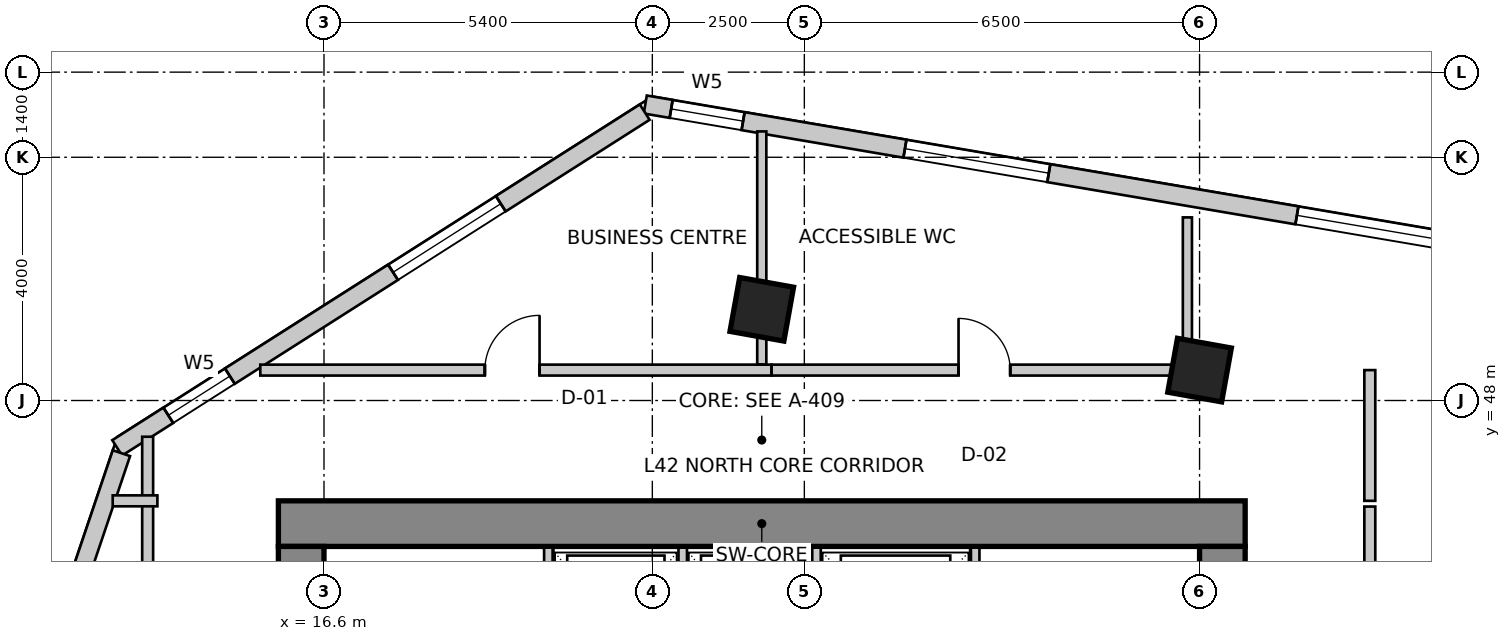
"""IFC4 building model, lengths in metres.
Left out: names, types, materials, properties, quantities, classifications, styles, units other than length and angle.
Written with IfcOpenShell. Run it as: python <this file> out.ifc"""

import sys

from ifc_helpers import new_model, si_unit, direction, frame, frame_2d, origin, origin_2d, place, context, subcontext, project, spatial, rectangle, extrude, source, transform, mapped, element, fill, save


model = new_model("IFC4")
c1 = context("Model", 3, precision=1e-05, world=origin(), true_north=direction((0.0, 1.0)))
c2 = subcontext(c1, "Body", "Model", "MODEL_VIEW")
j1 = project(units=[si_unit("LENGTHUNIT", "METRE"), si_unit("PLANEANGLEUNIT", "RADIAN")], contexts=[c1])
p1 = place(None, origin())
s1 = spatial("IfcSite", under=j1, at=p1, CompositionType="ELEMENT")
p2 = place(p1, origin())
s2 = spatial("IfcBuilding", under=s1, at=p2, CompositionType="ELEMENT")
p3 = place(p2, frame((0.0, 0.0, 168.2)))
s3 = spatial("IfcBuildingStorey", under=s2, at=p3, CompositionType="ELEMENT", Elevation=168.2)
p4 = place(p3, frame((15.85, 45.975, 0.0), z_axis=(0.0, 0.0, 1.0), x_axis=(1.0, 0.0, 0.0)))
e1 = element("IfcWall", 1, at=p4, inside=s3, PredefinedType="SHEAR", context=c2, shape_type="SweptSolid", body=[
    extrude(rectangle(XDim=15.9, YDim=0.75, at=frame_2d((7.95, 0.0))), origin(), (0.0, 0.0, 1.0), 3.6),
])
p5 = place(p3, frame((16.225, 34.2, 0.0), z_axis=(0.0, 0.0, 1.0), x_axis=(0.0, 1.0, 0.0)))
e2 = element("IfcWall", 2, at=p5, inside=s3, PredefinedType="SHEAR", context=c2, shape_type="SweptSolid", body=[
    extrude(rectangle(XDim=11.4, YDim=0.75, at=frame_2d((5.7, 0.0))), origin(), (0.0, 0.0, 1.0), 3.6),
])
m1 = source(origin(), c2, "Body", "SweptSolid", [
    extrude(rectangle(XDim=1.1, YDim=2.15, at=frame_2d((0.55, 1.075))), frame((0.0, 0.385, 0.0), z_axis=(0.0, -1.0, 0.0), x_axis=(1.0, 0.0, 0.0)), (0.0, 0.0, 1.0), 0.77),
])
p6 = place(p5, frame((7.15, 0.0, 0.0)))
e3 = element("IfcOpeningElement", 3, at=p6, cuts=e2, PredefinedType="OPENING", context=c2, shape_type="MappedRepresentation", body=[
    mapped(m1, transform((0.0, 0.0, 0.0), scale=1.0)),
])
p7 = place(p3, frame((31.375, 34.2, 0.0), z_axis=(0.0, 0.0, 1.0), x_axis=(0.0, 1.0, 0.0)))
e4 = element("IfcWall", 4, at=p7, inside=s3, PredefinedType="SHEAR", context=c2, shape_type="SweptSolid", body=[
    extrude(rectangle(XDim=11.4, YDim=0.75, at=frame_2d((5.7, 0.0))), origin(), (0.0, 0.0, 1.0), 3.6),
])
p8 = place(p7, frame((7.35, 0.0, 0.0)))
e5 = element("IfcOpeningElement", 5, at=p8, cuts=e4, PredefinedType="OPENING", context=c2, shape_type="MappedRepresentation", body=[
    mapped(m1, transform((0.0, 0.0, 0.0), scale=1.0)),
])
m2 = source(origin(), c2, "Body", "SweptSolid", [
    extrude(rectangle(XDim=0.9, YDim=0.9, at=origin_2d()), origin(), (0.0, 0.0, 1.0), 3.6),
])
for number, where, z_axis, x_axis in (
    (6, (23.8, 49.5, 0.0), (0.0, 0.0, 1.0), (0.984, -0.177, 0.0)),
    (7, (31.0, 48.5, 0.0), (0.0, 0.0, 1.0), (0.984, -0.177, 0.0)),
):
    element("IfcColumn", number, at=place(p3, frame(where, z_axis=z_axis, x_axis=x_axis)), inside=s3, PredefinedType="COLUMN", context=c2, shape_type="MappedRepresentation", body=[
        mapped(m2, transform((0.0, 0.0, 0.0), scale=1.0)),
    ])
p9 = place(p3, frame((53.561, 47.48, 0.0), z_axis=(0.0, 0.0, 1.0), x_axis=(-0.985845173895, 0.167658262868, 0.0)))
e8 = element("IfcWall", 8, at=p9, inside=s3, PredefinedType="SOLIDWALL", context=c2, shape_type="SweptSolid", body=[
    extrude(rectangle(XDim=32.132, YDim=0.3, at=frame_2d((16.066, 0.0))), origin(), (0.0, 0.0, 1.0), 3.3),
])
m3 = source(origin(), c2, "Body", "SweptSolid", [
    extrude(rectangle(XDim=2.4, YDim=2.2, at=frame_2d((1.2, 1.1))), frame((0.0, 0.16, 0.0), z_axis=(0.0, -1.0, 0.0), x_axis=(1.0, 0.0, 0.0)), (0.0, 0.0, 1.0), 0.32),
])
p10 = place(p9, frame((1.896, 0.0, 0.85)))
e9 = element("IfcOpeningElement", 9, at=p10, cuts=e8, PredefinedType="OPENING", context=c2, shape_type="MappedRepresentation", body=[
    mapped(m3, transform((0.0, 0.0, 0.0), scale=1.0)),
])
p11 = place(p9, frame((7.863, 0.0, 0.85)))
e10 = element("IfcOpeningElement", 10, at=p11, cuts=e8, PredefinedType="OPENING", context=c2, shape_type="MappedRepresentation", body=[
    mapped(m3, transform((0.0, 0.0, 0.0), scale=1.0)),
])
m4 = source(origin(), c2, "Body", "SweptSolid", [
    extrude(rectangle(XDim=2.1, YDim=2.0, at=frame_2d((1.05, 1.0))), frame((0.0, 0.16, 0.0), z_axis=(0.0, -1.0, 0.0), x_axis=(1.0, 0.0, 0.0)), (0.0, 0.0, 1.0), 0.32),
])
p12 = place(p9, frame((13.512, 0.0, 0.85)))
e11 = element("IfcOpeningElement", 11, at=p12, cuts=e8, PredefinedType="OPENING", context=c2, shape_type="MappedRepresentation", body=[
    mapped(m4, transform((0.0, 0.0, 0.0), scale=1.0)),
])
p13 = place(p9, frame((18.861, 0.0, 0.85)))
e12 = element("IfcOpeningElement", 12, at=p13, cuts=e8, PredefinedType="OPENING", context=c2, shape_type="MappedRepresentation", body=[
    mapped(m3, transform((0.0, 0.0, 0.0), scale=1.0)),
])
p14 = place(p9, frame((25.4, 0.0, 0.85)))
e13 = element("IfcOpeningElement", 13, at=p14, cuts=e8, PredefinedType="OPENING", context=c2, shape_type="MappedRepresentation", body=[
    mapped(m3, transform((0.0, 0.0, 0.0), scale=1.0)),
])
m5 = source(origin(), c2, "Body", "SweptSolid", [
    extrude(rectangle(XDim=1.2, YDim=1.6, at=frame_2d((0.6, 0.8))), frame((0.0, 0.16, 0.0), z_axis=(0.0, -1.0, 0.0), x_axis=(1.0, 0.0, 0.0)), (0.0, 0.0, 1.0), 0.32),
])
p15 = place(p9, frame((30.5, 0.0, 0.85)))
e14 = element("IfcOpeningElement", 14, at=p15, cuts=e8, PredefinedType="OPENING", context=c2, shape_type="MappedRepresentation", body=[
    mapped(m5, transform((0.0, 0.0, 0.0), scale=1.0)),
])
p16 = place(p3, frame((21.875, 52.742, 0.0), z_axis=(0.0, 0.0, 1.0), x_axis=(-0.843662465249, -0.536873956092, 0.0)))
e15 = element("IfcWall", 15, at=p16, inside=s3, PredefinedType="SOLIDWALL", context=c2, shape_type="SweptSolid", body=[
    extrude(rectangle(XDim=10.284, YDim=0.3, at=frame_2d((5.142, 0.0))), origin(), (0.0, 0.0, 1.0), 3.3),
])
p17 = place(p16, frame((2.806, 0.0, 0.85)))
e16 = element("IfcOpeningElement", 16, at=p17, cuts=e15, PredefinedType="OPENING", context=c2, shape_type="MappedRepresentation", body=[
    mapped(m4, transform((0.0, 0.0, 0.0), scale=1.0)),
])
p18 = place(p16, frame((8.087, 0.0, 0.85)))
e17 = element("IfcOpeningElement", 17, at=p18, cuts=e15, PredefinedType="OPENING", context=c2, shape_type="MappedRepresentation", body=[
    mapped(m5, transform((0.0, 0.0, 0.0), scale=1.0)),
])
p19 = place(p3, frame((13.269, 47.134, 0.0), z_axis=(0.0, 0.0, 1.0), x_axis=(-0.319929773322, -0.947441259468, 0.0)))
e18 = element("IfcWall", 18, at=p19, inside=s3, PredefinedType="SOLIDWALL", context=c2, shape_type="SweptSolid", body=[
    extrude(rectangle(XDim=16.134, YDim=0.3, at=frame_2d((8.067, 0.0))), origin(), (0.0, 0.0, 1.0), 3.3),
])
p20 = place(p19, frame((2.276, 0.0, 0.85)))
e19 = element("IfcOpeningElement", 19, at=p20, cuts=e18, PredefinedType="OPENING", context=c2, shape_type="MappedRepresentation", body=[
    mapped(m3, transform((0.0, 0.0, 0.0), scale=1.0)),
])
p21 = place(p19, frame((7.361, 0.0, 0.85)))
e20 = element("IfcOpeningElement", 20, at=p21, cuts=e18, PredefinedType="OPENING", context=c2, shape_type="MappedRepresentation", body=[
    mapped(m4, transform((0.0, 0.0, 0.0), scale=1.0)),
])
p22 = place(p19, frame((12.146, 0.0, 0.85)))
e21 = element("IfcOpeningElement", 21, at=p22, cuts=e18, PredefinedType="OPENING", context=c2, shape_type="MappedRepresentation", body=[
    mapped(m3, transform((0.0, 0.0, 0.0), scale=1.0)),
])
for number, where, z_axis, x_axis in (
    (22, (20.29, 43.28, 0.0), (0.0, 0.0, 1.0), (0.0, 1.0, 0.0)),
    (23, (27.31, 43.28, 0.0), (0.0, 0.0, 1.0), (0.0, 1.0, 0.0)),
):
    element("IfcWall", number, at=place(p3, frame(where, z_axis=z_axis, x_axis=x_axis)), inside=s3, PredefinedType="SOLIDWALL", context=c2, shape_type="SweptSolid", body=[
        extrude(rectangle(XDim=2.3, YDim=0.14, at=frame_2d((1.15, 0.0))), origin(), (0.0, 0.0, 1.0), 3.3),
    ])
for number, where, z_axis, x_axis in (
    (24, (22.5, 43.02, 0.0), (0.0, 0.0, 1.0), (0.0, 1.0, 0.0)),
    (25, (24.7, 43.02, 0.0), (0.0, 0.0, 1.0), (0.0, 1.0, 0.0)),
):
    element("IfcWall", number, at=place(p3, frame(where, z_axis=z_axis, x_axis=x_axis)), inside=s3, PredefinedType="SOLIDWALL", context=c2, shape_type="SweptSolid", body=[
        extrude(rectangle(XDim=2.56, YDim=0.14, at=frame_2d((1.28, 0.0))), origin(), (0.0, 0.0, 1.0), 3.3),
    ])
p23 = place(p3, frame((13.7, 33.544, 0.0), z_axis=(0.0, 0.0, 1.0), x_axis=(0.0, 1.0, 0.0)))
e26 = element("IfcWall", 26, at=p23, inside=s3, PredefinedType="PARTITIONING", context=c2, shape_type="SweptSolid", body=[
    extrude(rectangle(XDim=13.86, YDim=0.18, at=frame_2d((6.93, 0.0))), origin(), (0.0, 0.0, 1.0), 2.442),
])
m6 = source(origin(), c2, "Body", "SweptSolid", [
    extrude(rectangle(XDim=0.9, YDim=2.15, at=frame_2d((0.45, 1.075))), frame((0.0, 0.1, 0.0), z_axis=(0.0, -1.0, 0.0), x_axis=(1.0, 0.0, 0.0)), (0.0, 0.0, 1.0), 0.2),
])
p24 = place(p23, frame((4.253, 0.0, 0.0)))
e27 = element("IfcOpeningElement", 27, at=p24, cuts=e26, PredefinedType="OPENING", context=c2, shape_type="MappedRepresentation", body=[
    mapped(m6, transform((0.0, 0.0, 0.0), scale=1.0)),
])
p25 = place(p3, frame((13.86, 46.35, 0.0), z_axis=(0.0, 0.0, 1.0), x_axis=(-1.0, 0.0, 0.0)))
e28 = element("IfcWall", 28, at=p25, inside=s3, PredefinedType="PARTITIONING", context=c2, shape_type="SweptSolid", body=[
    extrude(rectangle(XDim=0.735, YDim=0.18, at=frame_2d((0.367, 0.0))), origin(), (0.0, 0.0, 1.0), 3.3),
])
p26 = place(p3, frame((15.552, 48.5, 0.0), z_axis=(0.0, 0.0, 1.0), x_axis=(1.0, 0.0, 0.0)))
e29 = element("IfcWall", 29, at=p26, inside=s3, PredefinedType="PARTITIONING", context=c2, shape_type="SweptSolid", body=[
    extrude(rectangle(XDim=8.407, YDim=0.18, at=frame_2d((4.204, 0.0))), origin(), (0.0, 0.0, 1.0), 2.885),
])
p27 = place(p26, frame((3.693, 0.0, 0.0)))
e30 = element("IfcOpeningElement", 30, at=p27, cuts=e29, PredefinedType="OPENING", context=c2, shape_type="MappedRepresentation", body=[
    mapped(m6, transform((0.0, 0.0, 0.0), scale=1.0)),
])
p28 = place(p3, frame((23.962, 48.5, 0.0), z_axis=(0.0, 0.0, 1.0), x_axis=(1.0, 0.0, 0.0)))
e31 = element("IfcWall", 31, at=p28, inside=s3, PredefinedType="PARTITIONING", context=c2, shape_type="SweptSolid", body=[
    extrude(rectangle(XDim=6.998, YDim=0.18, at=frame_2d((3.499, 0.0))), origin(), (0.0, 0.0, 1.0), 2.442),
])
m7 = source(origin(), c2, "Body", "SweptSolid", [
    extrude(rectangle(XDim=0.85, YDim=2.15, at=frame_2d((0.425, 1.075))), frame((0.0, 0.1, 0.0), z_axis=(0.0, -1.0, 0.0), x_axis=(1.0, 0.0, 0.0)), (0.0, 0.0, 1.0), 0.2),
])
p29 = place(p28, frame((3.074, 0.0, 0.0)))
e32 = element("IfcOpeningElement", 32, at=p29, cuts=e31, PredefinedType="OPENING", context=c2, shape_type="MappedRepresentation", body=[
    mapped(m7, transform((0.0, 0.0, 0.0), scale=1.0)),
])
p30 = place(p3, frame((33.8, 48.5, 0.0), z_axis=(0.0, 0.0, 1.0), x_axis=(0.0, -1.0, 0.0)))
e33 = element("IfcWall", 33, at=p30, inside=s3, PredefinedType="PARTITIONING", context=c2, shape_type="SweptSolid", body=[
    extrude(rectangle(XDim=2.15, YDim=0.18, at=frame_2d((1.075, 0.0))), origin(), (0.0, 0.0, 1.0), 2.442),
])
p31 = place(p3, frame((33.8, 46.256, 0.0), z_axis=(0.0, 0.0, 1.0), x_axis=(0.0, -1.0, 0.0)))
e34 = element("IfcWall", 34, at=p31, inside=s3, PredefinedType="PARTITIONING", context=c2, shape_type="SweptSolid", body=[
    extrude(rectangle(XDim=7.916, YDim=0.18, at=frame_2d((3.958, 0.0))), origin(), (0.0, 0.0, 1.0), 2.738),
])
m8 = source(origin(), c2, "Body", "SweptSolid", [
    extrude(rectangle(XDim=1.6, YDim=2.15, at=frame_2d((0.8, 1.075))), frame((0.0, 0.1, 0.0), z_axis=(0.0, -1.0, 0.0), x_axis=(1.0, 0.0, 0.0)), (0.0, 0.0, 1.0), 0.2),
])
p32 = place(p31, frame((3.097, 0.0, 0.0)))
e35 = element("IfcOpeningElement", 35, at=p32, cuts=e34, PredefinedType="OPENING", context=c2, shape_type="MappedRepresentation", body=[
    mapped(m8, transform((0.0, 0.0, 0.0), scale=1.0)),
])
p33 = place(p3, frame((23.8, 52.425, 0.0), z_axis=(0.0, 0.0, 1.0), x_axis=(0.0, -1.0, 0.0)))
e36 = element("IfcWall", 36, at=p33, inside=s3, PredefinedType="PARTITIONING", context=c2, shape_type="SweptSolid", body=[
    extrude(rectangle(XDim=3.831, YDim=0.15, at=frame_2d((1.916, 0.0))), origin(), (0.0, 0.0, 1.0), 2.442),
])
p34 = place(p3, frame((30.8, 51.011, 0.0), z_axis=(0.0, 0.0, 1.0), x_axis=(0.0, -1.0, 0.0)))
e37 = element("IfcWall", 37, at=p34, inside=s3, PredefinedType="PARTITIONING", context=c2, shape_type="SweptSolid", body=[
    extrude(rectangle(XDim=2.292, YDim=0.15, at=frame_2d((1.146, 0.0))), origin(), (0.0, 0.0, 1.0), 3.3),
])
m9 = source(origin(), c2, "Body", "SweptSolid", [
    extrude(rectangle(XDim=2.4, YDim=2.2, at=frame_2d((1.2, 1.1))), frame((0.0, -0.015, 0.0), z_axis=(0.0, -1.0, 0.0), x_axis=(1.0, 0.0, 0.0)), (0.0, 0.0, 1.0), 0.06),
])
p35 = place(p13, origin())
e38 = element("IfcWindow", 38, at=p35, inside=s3, PartitioningType="SINGLE_PANEL", PredefinedType="WINDOW", context=c2, shape_type="MappedRepresentation", body=[
    mapped(m9, transform((0.0, 0.0, 0.0), scale=1.0)),
])
fill(e12, e38)
p36 = place(p14, origin())
e39 = element("IfcWindow", 39, at=p36, inside=s3, PartitioningType="SINGLE_PANEL", PredefinedType="WINDOW", context=c2, shape_type="MappedRepresentation", body=[
    mapped(m9, transform((0.0, 0.0, 0.0), scale=1.0)),
])
fill(e13, e39)
m10 = source(origin(), c2, "Body", "SweptSolid", [
    extrude(rectangle(XDim=1.2, YDim=1.6, at=frame_2d((0.6, 0.8))), frame((0.0, -0.015, 0.0), z_axis=(0.0, -1.0, 0.0), x_axis=(1.0, 0.0, 0.0)), (0.0, 0.0, 1.0), 0.06),
])
p37 = place(p15, origin())
e40 = element("IfcWindow", 40, at=p37, inside=s3, PartitioningType="SINGLE_PANEL", PredefinedType="WINDOW", context=c2, shape_type="MappedRepresentation", body=[
    mapped(m10, transform((0.0, 0.0, 0.0), scale=1.0)),
])
fill(e14, e40)
m11 = source(origin(), c2, "Body", "SweptSolid", [
    extrude(rectangle(XDim=2.1, YDim=2.0, at=frame_2d((1.05, 1.0))), frame((0.0, -0.015, 0.0), z_axis=(0.0, -1.0, 0.0), x_axis=(1.0, 0.0, 0.0)), (0.0, 0.0, 1.0), 0.06),
])
p38 = place(p17, origin())
e41 = element("IfcWindow", 41, at=p38, inside=s3, PartitioningType="SINGLE_PANEL", PredefinedType="WINDOW", context=c2, shape_type="MappedRepresentation", body=[
    mapped(m11, transform((0.0, 0.0, 0.0), scale=1.0)),
])
fill(e16, e41)
p39 = place(p18, origin())
e42 = element("IfcWindow", 42, at=p39, inside=s3, PartitioningType="SINGLE_PANEL", PredefinedType="WINDOW", context=c2, shape_type="MappedRepresentation", body=[
    mapped(m10, transform((0.0, 0.0, 0.0), scale=1.0)),
])
fill(e17, e42)
m12 = source(origin(), c2, "Body", "SweptSolid", [
    extrude(rectangle(XDim=0.9, YDim=2.15, at=frame_2d((0.45, 1.075))), frame((0.0, 0.025, 0.0), z_axis=(0.0, -1.0, 0.0), x_axis=(1.0, 0.0, 0.0)), (0.0, 0.0, 1.0), 0.05),
])
p40 = place(p27, origin())
e43 = element("IfcDoor", 43, at=p40, inside=s3, OperationType="SINGLE_SWING_RIGHT", PredefinedType="DOOR", context=c2, shape_type="MappedRepresentation", body=[
    mapped(m12, transform((0.0, 0.0, 0.0), scale=1.0)),
])
fill(e30, e43)
m13 = source(origin(), c2, "Body", "SweptSolid", [
    extrude(rectangle(XDim=0.85, YDim=2.15, at=frame_2d((0.425, 1.075))), frame((0.0, 0.025, 0.0), z_axis=(0.0, -1.0, 0.0), x_axis=(1.0, 0.0, 0.0)), (0.0, 0.0, 1.0), 0.05),
])
p41 = place(p29, origin())
e44 = element("IfcDoor", 44, at=p41, inside=s3, OperationType="SINGLE_SWING_LEFT", PredefinedType="DOOR", context=c2, shape_type="MappedRepresentation", body=[
    mapped(m13, transform((0.0, 0.0, 0.0), scale=1.0)),
])
fill(e32, e44)
save(model, sys.argv[1])
